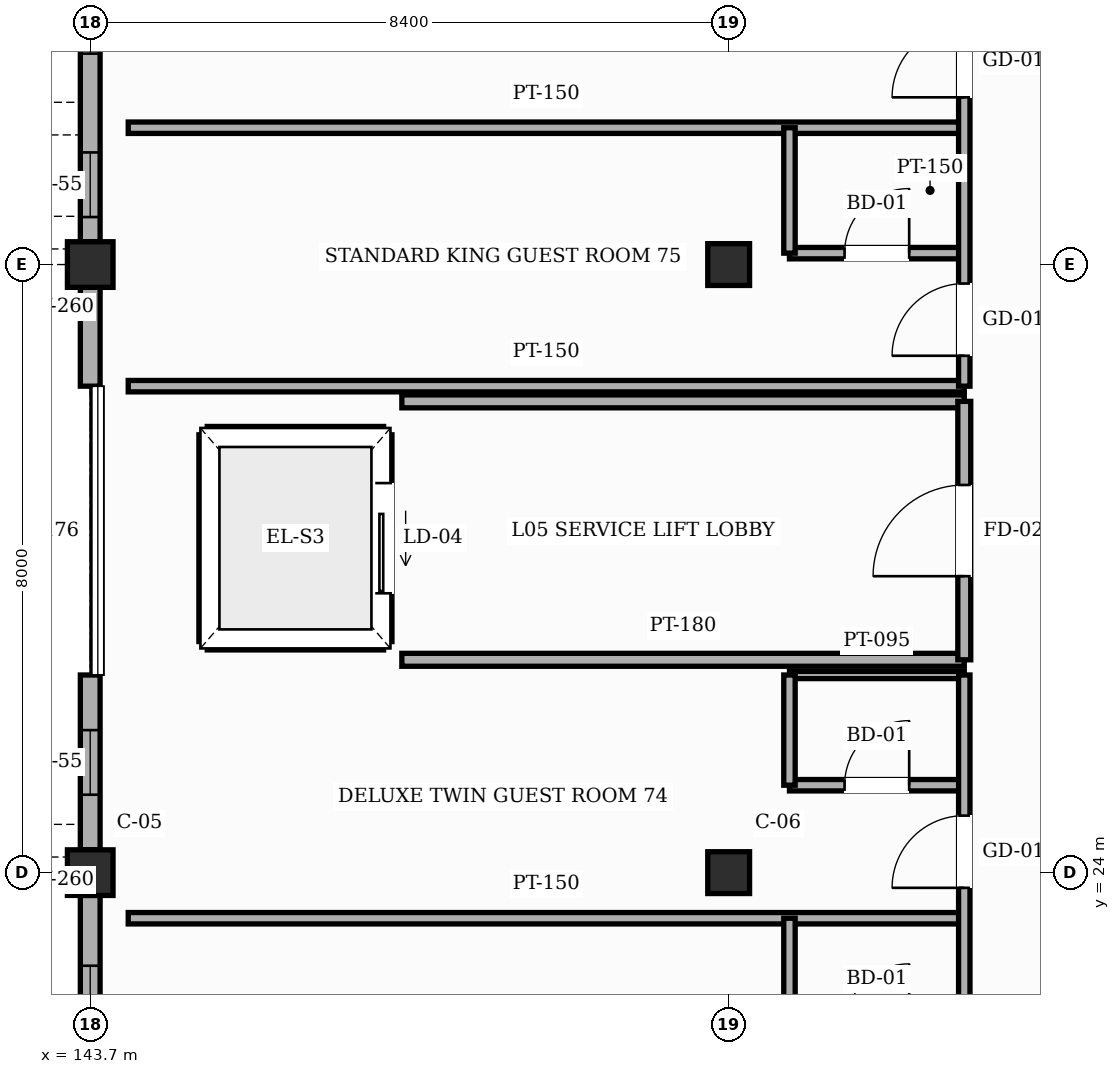
"""IFC4 building model, lengths in metres.
Left out: names, types, materials, properties, quantities, classifications, styles, units other than length and angle.
Written with IfcOpenShell. Run it as: python <this file> out.ifc"""

import sys

from ifc_helpers import new_model, si_unit, direction, frame, frame_2d, origin, origin_2d, place, context, subcontext, project, spatial, rectangle, hollow_rectangle, extrude, element, fill, save


model = new_model("IFC4")
c1 = context("Model", 3, precision=1e-05, world=origin(), true_north=direction((0.0, 1.0)))
c2 = subcontext(c1, "Body", "Model", "MODEL_VIEW")
j1 = project(units=[si_unit("LENGTHUNIT", "METRE"), si_unit("PLANEANGLEUNIT", "RADIAN")], contexts=[c1])
p1 = place(None, origin())
s1 = spatial("IfcSite", under=j1, at=p1, CompositionType="ELEMENT")
p2 = place(p1, origin())
s2 = spatial("IfcBuilding", under=s1, at=p2, CompositionType="ELEMENT")
p3 = place(p2, frame((0.0, 0.0, 24.6)))
s3 = spatial("IfcBuildingStorey", under=s2, at=p3, CompositionType="ELEMENT", Elevation=24.6)
for number, where, z_axis, x_axis in (
    (1, (143.7, 24.0, 0.0), (0.0, 0.0, 1.0), (1.0, 0.0, 0.0)),
    (2, (143.7, 32.0, 0.0), (0.0, 0.0, 1.0), (1.0, 0.0, 0.0)),
):
    element("IfcColumn", number, at=place(p3, frame(where, z_axis=z_axis, x_axis=x_axis)), inside=s3, PredefinedType="COLUMN", context=c2, shape_type="SweptSolid", body=[
        extrude(hollow_rectangle(XDim=0.6, YDim=0.6, WallThickness=0.025, InnerFilletRadius=0.025, OuterFilletRadius=0.05, at=origin_2d()), origin(), (0.0, 0.0, 1.0), 3.6),
    ])
for number, where, z_axis, x_axis in (
    (3, (152.1, 24.0, 0.0), (0.0, 0.0, 1.0), (1.0, 0.0, 0.0)),
    (4, (152.1, 32.0, 0.0), (0.0, 0.0, 1.0), (1.0, 0.0, 0.0)),
):
    element("IfcColumn", number, at=place(p3, frame(where, z_axis=z_axis, x_axis=x_axis)), inside=s3, PredefinedType="COLUMN", context=c2, shape_type="SweptSolid", body=[
        extrude(hollow_rectangle(XDim=0.55, YDim=0.55, WallThickness=0.022, InnerFilletRadius=0.022, OuterFilletRadius=0.044, at=origin_2d()), origin(), (0.0, 0.0, 1.0), 3.6),
    ])
p4 = place(p3, frame((143.7, 16.3, 0.0), z_axis=(0.0, 0.0, 1.0), x_axis=(0.0, 1.0, 0.0)))
e5 = element("IfcWall", 5, at=p4, inside=s3, PredefinedType="SOLIDWALL", context=c2, shape_type="SweptSolid", body=[
    extrude(rectangle(XDim=7.4, YDim=0.26, at=frame_2d((3.7, 0.0))), origin(), (0.0, 0.0, 1.0), 2.805),
])
p5 = place(p4, frame((1.425, 0.0, 0.85)))
e6 = element("IfcOpeningElement", 6, at=p5, cuts=e5, PredefinedType="OPENING", context=c2, shape_type="SweptSolid", body=[
    extrude(rectangle(XDim=1.75, YDim=1.35, at=frame_2d((0.875, 0.675))), frame((0.0, 0.14, 0.0), z_axis=(0.0, -1.0, 0.0), x_axis=(1.0, 0.0, 0.0)), (0.0, 0.0, 1.0), 0.28),
])
p6 = place(p4, frame((4.525, 0.0, 0.85)))
e7 = element("IfcOpeningElement", 7, at=p6, cuts=e5, PredefinedType="OPENING", context=c2, shape_type="SweptSolid", body=[
    extrude(rectangle(XDim=1.95, YDim=1.35, at=frame_2d((0.975, 0.675))), frame((0.0, 0.14, 0.0), z_axis=(0.0, -1.0, 0.0), x_axis=(1.0, 0.0, 0.0)), (0.0, 0.0, 1.0), 0.28),
])
p7 = place(p3, frame((143.7, 24.3, 0.0), z_axis=(0.0, 0.0, 1.0), x_axis=(0.0, 1.0, 0.0)))
e8 = element("IfcWall", 8, at=p7, inside=s3, PredefinedType="SOLIDWALL", context=c2, shape_type="SweptSolid", body=[
    extrude(rectangle(XDim=2.3, YDim=0.26, at=frame_2d((1.15, 0.0))), origin(), (0.0, 0.0, 1.0), 2.805),
])
p8 = place(p7, frame((0.725, 0.0, 0.85)))
e9 = element("IfcOpeningElement", 9, at=p8, cuts=e8, PredefinedType="OPENING", context=c2, shape_type="SweptSolid", body=[
    extrude(rectangle(XDim=0.85, YDim=1.35, at=frame_2d((0.425, 0.675))), frame((0.0, 0.14, 0.0), z_axis=(0.0, -1.0, 0.0), x_axis=(1.0, 0.0, 0.0)), (0.0, 0.0, 1.0), 0.28),
])
p9 = place(p3, frame((143.7, 30.4, 0.0), z_axis=(0.0, 0.0, 1.0), x_axis=(0.0, 1.0, 0.0)))
e10 = element("IfcWall", 10, at=p9, inside=s3, PredefinedType="SOLIDWALL", context=c2, shape_type="SweptSolid", body=[
    extrude(rectangle(XDim=1.3, YDim=0.26, at=frame_2d((0.65, 0.0))), origin(), (0.0, 0.0, 1.0), 2.805),
])
p10 = place(p3, frame((143.7, 32.3, 0.0), z_axis=(0.0, 0.0, 1.0), x_axis=(0.0, 1.0, 0.0)))
e11 = element("IfcWall", 11, at=p10, inside=s3, PredefinedType="SOLIDWALL", context=c2, shape_type="SweptSolid", body=[
    extrude(rectangle(XDim=8.3, YDim=0.26, at=frame_2d((4.15, 0.0))), origin(), (0.0, 0.0, 1.0), 2.655),
])
p11 = place(p10, frame((0.325, 0.0, 0.85)))
e12 = element("IfcOpeningElement", 12, at=p11, cuts=e11, PredefinedType="OPENING", context=c2, shape_type="SweptSolid", body=[
    extrude(rectangle(XDim=0.85, YDim=1.35, at=frame_2d((0.425, 0.675))), frame((0.0, 0.14, 0.0), z_axis=(0.0, -1.0, 0.0), x_axis=(1.0, 0.0, 0.0)), (0.0, 0.0, 1.0), 0.28),
])
p12 = place(p10, frame((2.475, 0.0, 0.85)))
e13 = element("IfcOpeningElement", 13, at=p12, cuts=e11, PredefinedType="OPENING", context=c2, shape_type="SweptSolid", body=[
    extrude(rectangle(XDim=1.45, YDim=1.35, at=frame_2d((0.725, 0.675))), frame((0.0, 0.14, 0.0), z_axis=(0.0, -1.0, 0.0), x_axis=(1.0, 0.0, 0.0)), (0.0, 0.0, 1.0), 0.28),
])
p13 = place(p10, frame((5.775, 0.0, 0.85)))
e14 = element("IfcOpeningElement", 14, at=p13, cuts=e11, PredefinedType="OPENING", context=c2, shape_type="SweptSolid", body=[
    extrude(rectangle(XDim=1.65, YDim=1.35, at=frame_2d((0.825, 0.675))), frame((0.0, 0.14, 0.0), z_axis=(0.0, -1.0, 0.0), x_axis=(1.0, 0.0, 0.0)), (0.0, 0.0, 1.0), 0.28),
])
for number, where, z_axis, x_axis in (
    (15, (145.24, 29.76, 0.0), (0.0, 0.0, 1.0), (1.0, 0.0, 0.0)),
    (16, (145.24, 27.04, 0.0), (0.0, 0.0, 1.0), (1.0, 0.0, 0.0)),
):
    element("IfcWall", number, at=place(p3, frame(where, z_axis=z_axis, x_axis=x_axis)), inside=s3, PredefinedType="SHEAR", context=c2, shape_type="SweptSolid", body=[
        extrude(rectangle(XDim=2.32, YDim=0.22, at=frame_2d((1.16, 0.0))), origin(), (0.0, 0.0, 1.0), 3.38),
    ])
p14 = place(p3, frame((147.56, 27.04, 0.0), z_axis=(0.0, 0.0, 1.0), x_axis=(0.0, 1.0, 0.0)))
e17 = element("IfcWall", 17, at=p14, inside=s3, PredefinedType="SHEAR", context=c2, shape_type="SweptSolid", body=[
    extrude(rectangle(XDim=2.72, YDim=0.22, at=frame_2d((1.36, 0.0))), origin(), (0.0, 0.0, 1.0), 3.38),
])
p15 = place(p14, frame((0.635, 0.0, 0.0)))
e18 = element("IfcOpeningElement", 18, at=p15, cuts=e17, PredefinedType="OPENING", context=c2, shape_type="SweptSolid", body=[
    extrude(rectangle(XDim=1.45, YDim=2.35, at=frame_2d((0.725, 1.175))), frame((0.0, 0.12, 0.0), z_axis=(0.0, -1.0, 0.0), x_axis=(1.0, 0.0, 0.0)), (0.0, 0.0, 1.0), 0.24),
])
p16 = place(p3, frame((145.24, 27.04, 0.0), z_axis=(0.0, 0.0, 1.0), x_axis=(0.0, 1.0, 0.0)))
e19 = element("IfcWall", 19, at=p16, inside=s3, PredefinedType="SHEAR", context=c2, shape_type="SweptSolid", body=[
    extrude(rectangle(XDim=2.72, YDim=0.22, at=frame_2d((1.36, 0.0))), origin(), (0.0, 0.0, 1.0), 3.38),
])
p17 = place(p3, frame((144.2, 23.4, 0.0), z_axis=(0.0, 0.0, 1.0), x_axis=(1.0, 0.0, 0.0)))
e20 = element("IfcWall", 20, at=p17, inside=s3, PredefinedType="PARTITIONING", context=c2, shape_type="SweptSolid", body=[
    extrude(rectangle(XDim=11.0, YDim=0.15, at=frame_2d((5.5, 0.0))), origin(), (0.0, 0.0, 1.0), 3.365),
])
p18 = place(p3, frame((152.9, 25.15, 0.0), z_axis=(0.0, 0.0, 1.0), x_axis=(1.0, 0.0, 0.0)))
e21 = element("IfcWall", 21, at=p18, inside=s3, PredefinedType="PARTITIONING", context=c2, shape_type="SweptSolid", body=[
    extrude(rectangle(XDim=2.3, YDim=0.15, at=frame_2d((1.15, 0.0))), origin(), (0.0, 0.0, 1.0), 3.365),
])
p19 = place(p18, frame((0.725, 0.0, 0.0)))
e22 = element("IfcOpeningElement", 22, at=p19, cuts=e21, PredefinedType="OPENING", context=c2, shape_type="SweptSolid", body=[
    extrude(rectangle(XDim=0.85, YDim=2.1, at=frame_2d((0.425, 1.05))), frame((0.0, 0.085, 0.0), z_axis=(0.0, -1.0, 0.0), x_axis=(1.0, 0.0, 0.0)), (0.0, 0.0, 1.0), 0.17),
])
p20 = place(p3, frame((152.9, 26.6, 0.0), z_axis=(0.0, 0.0, 1.0), x_axis=(1.0, 0.0, 0.0)))
e23 = element("IfcWall", 23, at=p20, inside=s3, PredefinedType="PARTITIONING", context=c2, shape_type="SweptSolid", body=[
    extrude(rectangle(XDim=2.3, YDim=0.095, at=frame_2d((1.15, 0.0))), origin(), (0.0, 0.0, 1.0), 3.365),
])
for number, where, z_axis, x_axis in (
    (24, (147.8, 26.8, 0.0), (0.0, 0.0, 1.0), (1.0, 0.0, 0.0)),
    (25, (147.8, 30.2, 0.0), (0.0, 0.0, 1.0), (1.0, 0.0, 0.0)),
):
    element("IfcWall", number, at=place(p3, frame(where, z_axis=z_axis, x_axis=x_axis)), inside=s3, PredefinedType="PARTITIONING", context=c2, shape_type="SweptSolid", body=[
        extrude(rectangle(XDim=7.4, YDim=0.17, at=frame_2d((3.7, 0.0))), origin(), (0.0, 0.0, 1.0), 3.365),
    ])
p21 = place(p3, frame((144.2, 30.4, 0.0), z_axis=(0.0, 0.0, 1.0), x_axis=(1.0, 0.0, 0.0)))
e26 = element("IfcWall", 26, at=p21, inside=s3, PredefinedType="PARTITIONING", context=c2, shape_type="SweptSolid", body=[
    extrude(rectangle(XDim=11.0, YDim=0.15, at=frame_2d((5.5, 0.0))), origin(), (0.0, 0.0, 1.0), 3.365),
])
p22 = place(p3, frame((152.9, 32.15, 0.0), z_axis=(0.0, 0.0, 1.0), x_axis=(1.0, 0.0, 0.0)))
e27 = element("IfcWall", 27, at=p22, inside=s3, PredefinedType="PARTITIONING", context=c2, shape_type="SweptSolid", body=[
    extrude(rectangle(XDim=2.3, YDim=0.15, at=frame_2d((1.15, 0.0))), origin(), (0.0, 0.0, 1.0), 2.805),
])
p23 = place(p22, frame((0.725, 0.0, 0.0)))
e28 = element("IfcOpeningElement", 28, at=p23, cuts=e27, PredefinedType="OPENING", context=c2, shape_type="SweptSolid", body=[
    extrude(rectangle(XDim=0.85, YDim=2.1, at=frame_2d((0.425, 1.05))), frame((0.0, 0.085, 0.0), z_axis=(0.0, -1.0, 0.0), x_axis=(1.0, 0.0, 0.0)), (0.0, 0.0, 1.0), 0.17),
])
p24 = place(p3, frame((144.2, 33.8, 0.0), z_axis=(0.0, 0.0, 1.0), x_axis=(1.0, 0.0, 0.0)))
e29 = element("IfcWall", 29, at=p24, inside=s3, PredefinedType="PARTITIONING", context=c2, shape_type="SweptSolid", body=[
    extrude(rectangle(XDim=11.0, YDim=0.15, at=frame_2d((5.5, 0.0))), origin(), (0.0, 0.0, 1.0), 3.365),
])
p25 = place(p3, frame((152.9, 21.95, 0.0), z_axis=(0.0, 0.0, 1.0), x_axis=(0.0, 1.0, 0.0)))
e30 = element("IfcWall", 30, at=p25, inside=s3, PredefinedType="PARTITIONING", context=c2, shape_type="SweptSolid", body=[
    extrude(rectangle(XDim=1.45, YDim=0.15, at=frame_2d((0.725, 0.0))), origin(), (0.0, 0.0, 1.0), 3.365),
])
p26 = place(p3, frame((152.9, 25.15, 0.0), z_axis=(0.0, 0.0, 1.0), x_axis=(0.0, 1.0, 0.0)))
e31 = element("IfcWall", 31, at=p26, inside=s3, PredefinedType="PARTITIONING", context=c2, shape_type="SweptSolid", body=[
    extrude(rectangle(XDim=1.45, YDim=0.15, at=frame_2d((0.725, 0.0))), origin(), (0.0, 0.0, 1.0), 3.365),
])
p27 = place(p3, frame((152.9, 32.15, 0.0), z_axis=(0.0, 0.0, 1.0), x_axis=(0.0, 1.0, 0.0)))
e32 = element("IfcWall", 32, at=p27, inside=s3, PredefinedType="PARTITIONING", context=c2, shape_type="SweptSolid", body=[
    extrude(rectangle(XDim=1.65, YDim=0.15, at=frame_2d((0.825, 0.0))), origin(), (0.0, 0.0, 1.0), 3.365),
])
p28 = place(p3, frame((155.2, 1.0, 0.0), z_axis=(0.0, 0.0, 1.0), x_axis=(0.0, 1.0, 0.0)))
e33 = element("IfcWall", 33, at=p28, inside=s3, PredefinedType="PARTITIONING", context=c2, shape_type="SweptSolid", body=[
    extrude(rectangle(XDim=25.6, YDim=0.15, at=frame_2d((12.8, 0.0))), origin(), (0.0, 0.0, 1.0), 3.365),
])
p29 = place(p28, frame((0.325, 0.0, 0.0)))
e34 = element("IfcOpeningElement", 34, at=p29, cuts=e33, PredefinedType="OPENING", context=c2, shape_type="SweptSolid", body=[
    extrude(rectangle(XDim=1.1, YDim=2.2, at=frame_2d((0.55, 1.1))), frame((0.0, 0.085, 0.0), z_axis=(0.0, -1.0, 0.0), x_axis=(1.0, 0.0, 0.0)), (0.0, 0.0, 1.0), 0.17),
])
p30 = place(p28, frame((3.6, 0.0, 0.0)))
e35 = element("IfcOpeningElement", 35, at=p30, cuts=e33, PredefinedType="OPENING", context=c2, shape_type="SweptSolid", body=[
    extrude(rectangle(XDim=0.95, YDim=2.15, at=frame_2d((0.475, 1.075))), frame((0.0, 0.085, 0.0), z_axis=(0.0, -1.0, 0.0), x_axis=(1.0, 0.0, 0.0)), (0.0, 0.0, 1.0), 0.17),
])
p31 = place(p28, frame((6.8, 0.0, 0.0)))
e36 = element("IfcOpeningElement", 36, at=p31, cuts=e33, PredefinedType="OPENING", context=c2, shape_type="SweptSolid", body=[
    extrude(rectangle(XDim=0.95, YDim=2.15, at=frame_2d((0.475, 1.075))), frame((0.0, 0.085, 0.0), z_axis=(0.0, -1.0, 0.0), x_axis=(1.0, 0.0, 0.0)), (0.0, 0.0, 1.0), 0.17),
])
p32 = place(p28, frame((10.0, 0.0, 0.0)))
e37 = element("IfcOpeningElement", 37, at=p32, cuts=e33, PredefinedType="OPENING", context=c2, shape_type="SweptSolid", body=[
    extrude(rectangle(XDim=0.95, YDim=2.15, at=frame_2d((0.475, 1.075))), frame((0.0, 0.085, 0.0), z_axis=(0.0, -1.0, 0.0), x_axis=(1.0, 0.0, 0.0)), (0.0, 0.0, 1.0), 0.17),
])
p33 = place(p28, frame((13.2, 0.0, 0.0)))
e38 = element("IfcOpeningElement", 38, at=p33, cuts=e33, PredefinedType="OPENING", context=c2, shape_type="SweptSolid", body=[
    extrude(rectangle(XDim=0.95, YDim=2.15, at=frame_2d((0.475, 1.075))), frame((0.0, 0.085, 0.0), z_axis=(0.0, -1.0, 0.0), x_axis=(1.0, 0.0, 0.0)), (0.0, 0.0, 1.0), 0.17),
])
p34 = place(p28, frame((16.4, 0.0, 0.0)))
e39 = element("IfcOpeningElement", 39, at=p34, cuts=e33, PredefinedType="OPENING", context=c2, shape_type="SweptSolid", body=[
    extrude(rectangle(XDim=0.95, YDim=2.15, at=frame_2d((0.475, 1.075))), frame((0.0, 0.085, 0.0), z_axis=(0.0, -1.0, 0.0), x_axis=(1.0, 0.0, 0.0)), (0.0, 0.0, 1.0), 0.17),
])
p35 = place(p28, frame((19.6, 0.0, 0.0)))
e40 = element("IfcOpeningElement", 40, at=p35, cuts=e33, PredefinedType="OPENING", context=c2, shape_type="SweptSolid", body=[
    extrude(rectangle(XDim=0.95, YDim=2.15, at=frame_2d((0.475, 1.075))), frame((0.0, 0.085, 0.0), z_axis=(0.0, -1.0, 0.0), x_axis=(1.0, 0.0, 0.0)), (0.0, 0.0, 1.0), 0.17),
])
p36 = place(p28, frame((22.8, 0.0, 0.0)))
e41 = element("IfcOpeningElement", 41, at=p36, cuts=e33, PredefinedType="OPENING", context=c2, shape_type="SweptSolid", body=[
    extrude(rectangle(XDim=0.95, YDim=2.15, at=frame_2d((0.475, 1.075))), frame((0.0, 0.085, 0.0), z_axis=(0.0, -1.0, 0.0), x_axis=(1.0, 0.0, 0.0)), (0.0, 0.0, 1.0), 0.17),
])
p37 = place(p3, frame((155.2, 26.8, 0.0), z_axis=(0.0, 0.0, 1.0), x_axis=(0.0, 1.0, 0.0)))
e42 = element("IfcWall", 42, at=p37, inside=s3, PredefinedType="PARTITIONING", context=c2, shape_type="SweptSolid", body=[
    extrude(rectangle(XDim=3.4, YDim=0.17, at=frame_2d((1.7, 0.0))), origin(), (0.0, 0.0, 1.0), 3.365),
])
p38 = place(p37, frame((1.1, 0.0, 0.0)))
e43 = element("IfcOpeningElement", 43, at=p38, cuts=e42, PredefinedType="OPENING", context=c2, shape_type="SweptSolid", body=[
    extrude(rectangle(XDim=1.2, YDim=2.2, at=frame_2d((0.6, 1.1))), frame((0.0, 0.095, 0.0), z_axis=(0.0, -1.0, 0.0), x_axis=(1.0, 0.0, 0.0)), (0.0, 0.0, 1.0), 0.19),
])
p39 = place(p3, frame((155.2, 30.4, 0.0), z_axis=(0.0, 0.0, 1.0), x_axis=(0.0, 1.0, 0.0)))
e44 = element("IfcWall", 44, at=p39, inside=s3, PredefinedType="PARTITIONING", context=c2, shape_type="SweptSolid", body=[
    extrude(rectangle(XDim=10.2, YDim=0.15, at=frame_2d((5.1, 0.0))), origin(), (0.0, 0.0, 1.0), 3.365),
])
p40 = place(p39, frame((0.4, 0.0, 0.0)))
e45 = element("IfcOpeningElement", 45, at=p40, cuts=e44, PredefinedType="OPENING", context=c2, shape_type="SweptSolid", body=[
    extrude(rectangle(XDim=0.95, YDim=2.15, at=frame_2d((0.475, 1.075))), frame((0.0, 0.085, 0.0), z_axis=(0.0, -1.0, 0.0), x_axis=(1.0, 0.0, 0.0)), (0.0, 0.0, 1.0), 0.17),
])
p41 = place(p39, frame((3.8, 0.0, 0.0)))
e46 = element("IfcOpeningElement", 46, at=p41, cuts=e44, PredefinedType="OPENING", context=c2, shape_type="SweptSolid", body=[
    extrude(rectangle(XDim=0.95, YDim=2.15, at=frame_2d((0.475, 1.075))), frame((0.0, 0.085, 0.0), z_axis=(0.0, -1.0, 0.0), x_axis=(1.0, 0.0, 0.0)), (0.0, 0.0, 1.0), 0.17),
])
p42 = place(p39, frame((7.2, 0.0, 0.0)))
e47 = element("IfcOpeningElement", 47, at=p42, cuts=e44, PredefinedType="OPENING", context=c2, shape_type="SweptSolid", body=[
    extrude(rectangle(XDim=0.95, YDim=2.15, at=frame_2d((0.475, 1.075))), frame((0.0, 0.085, 0.0), z_axis=(0.0, -1.0, 0.0), x_axis=(1.0, 0.0, 0.0)), (0.0, 0.0, 1.0), 0.17),
])
p43 = place(p6, origin())
e48 = element("IfcWindow", 48, at=p43, inside=s3, PartitioningType="SINGLE_PANEL", PredefinedType="WINDOW", context=c2, shape_type="SweptSolid", body=[
    extrude(rectangle(XDim=1.95, YDim=1.35, at=frame_2d((0.975, 0.675))), frame((0.0, 0.03, 0.0), z_axis=(0.0, -1.0, 0.0), x_axis=(1.0, 0.0, 0.0)), (0.0, 0.0, 1.0), 0.06),
])
fill(e7, e48)
p44 = place(p8, origin())
e49 = element("IfcWindow", 49, at=p44, inside=s3, PartitioningType="SINGLE_PANEL", PredefinedType="WINDOW", context=c2, shape_type="SweptSolid", body=[
    extrude(rectangle(XDim=0.85, YDim=1.35, at=frame_2d((0.425, 0.675))), frame((0.0, 0.03, 0.0), z_axis=(0.0, -1.0, 0.0), x_axis=(1.0, 0.0, 0.0)), (0.0, 0.0, 1.0), 0.06),
])
fill(e9, e49)
p45 = place(p11, origin())
e50 = element("IfcWindow", 50, at=p45, inside=s3, PartitioningType="SINGLE_PANEL", PredefinedType="WINDOW", context=c2, shape_type="SweptSolid", body=[
    extrude(rectangle(XDim=0.85, YDim=1.35, at=frame_2d((0.425, 0.675))), frame((0.0, 0.03, 0.0), z_axis=(0.0, -1.0, 0.0), x_axis=(1.0, 0.0, 0.0)), (0.0, 0.0, 1.0), 0.06),
])
fill(e12, e50)
p46 = place(p12, origin())
e51 = element("IfcWindow", 51, at=p46, inside=s3, PartitioningType="SINGLE_PANEL", PredefinedType="WINDOW", context=c2, shape_type="SweptSolid", body=[
    extrude(rectangle(XDim=1.45, YDim=1.35, at=frame_2d((0.725, 0.675))), frame((0.0, 0.03, 0.0), z_axis=(0.0, -1.0, 0.0), x_axis=(1.0, 0.0, 0.0)), (0.0, 0.0, 1.0), 0.06),
])
fill(e13, e51)
p47 = place(p15, origin())
e52 = element("IfcDoor", 52, at=p47, inside=s3, OperationType="SLIDING_TO_LEFT", PredefinedType="DOOR", context=c2, shape_type="SweptSolid", body=[
    extrude(rectangle(XDim=1.45, YDim=2.35, at=frame_2d((0.725, 1.175))), frame((0.0, 0.025, 0.0), z_axis=(0.0, -1.0, 0.0), x_axis=(1.0, 0.0, 0.0)), (0.0, 0.0, 1.0), 0.05),
])
fill(e18, e52)
p48 = place(p38, origin())
e53 = element("IfcDoor", 53, at=p48, inside=s3, OperationType="SINGLE_SWING_LEFT", PredefinedType="DOOR", context=c2, shape_type="SweptSolid", body=[
    extrude(rectangle(XDim=1.2, YDim=2.2, at=frame_2d((0.6, 1.1))), frame((0.0, 0.025, 0.0), z_axis=(0.0, -1.0, 0.0), x_axis=(1.0, 0.0, 0.0)), (0.0, 0.0, 1.0), 0.05),
])
fill(e43, e53)
p49 = place(p36, origin())
e54 = element("IfcDoor", 54, at=p49, inside=s3, OperationType="SINGLE_SWING_LEFT", PredefinedType="DOOR", context=c2, shape_type="SweptSolid", body=[
    extrude(rectangle(XDim=0.95, YDim=2.15, at=frame_2d((0.475, 1.075))), frame((0.0, 0.025, 0.0), z_axis=(0.0, -1.0, 0.0), x_axis=(1.0, 0.0, 0.0)), (0.0, 0.0, 1.0), 0.05),
])
fill(e41, e54)
p50 = place(p19, origin())
e55 = element("IfcDoor", 55, at=p50, inside=s3, OperationType="SINGLE_SWING_RIGHT", PredefinedType="DOOR", context=c2, shape_type="SweptSolid", body=[
    extrude(rectangle(XDim=0.85, YDim=2.1, at=frame_2d((0.425, 1.05))), frame((0.0, 0.025, 0.0), z_axis=(0.0, -1.0, 0.0), x_axis=(1.0, 0.0, 0.0)), (0.0, 0.0, 1.0), 0.05),
])
fill(e22, e55)
p51 = place(p40, origin())
e56 = element("IfcDoor", 56, at=p51, inside=s3, OperationType="SINGLE_SWING_LEFT", PredefinedType="DOOR", context=c2, shape_type="SweptSolid", body=[
    extrude(rectangle(XDim=0.95, YDim=2.15, at=frame_2d((0.475, 1.075))), frame((0.0, 0.025, 0.0), z_axis=(0.0, -1.0, 0.0), x_axis=(1.0, 0.0, 0.0)), (0.0, 0.0, 1.0), 0.05),
])
fill(e45, e56)
p52 = place(p23, origin())
e57 = element("IfcDoor", 57, at=p52, inside=s3, OperationType="SINGLE_SWING_RIGHT", PredefinedType="DOOR", context=c2, shape_type="SweptSolid", body=[
    extrude(rectangle(XDim=0.85, YDim=2.1, at=frame_2d((0.425, 1.05))), frame((0.0, 0.025, 0.0), z_axis=(0.0, -1.0, 0.0), x_axis=(1.0, 0.0, 0.0)), (0.0, 0.0, 1.0), 0.05),
])
fill(e28, e57)
p53 = place(p41, origin())
e58 = element("IfcDoor", 58, at=p53, inside=s3, OperationType="SINGLE_SWING_LEFT", PredefinedType="DOOR", context=c2, shape_type="SweptSolid", body=[
    extrude(rectangle(XDim=0.95, YDim=2.15, at=frame_2d((0.475, 1.075))), frame((0.0, 0.025, 0.0), z_axis=(0.0, -1.0, 0.0), x_axis=(1.0, 0.0, 0.0)), (0.0, 0.0, 1.0), 0.05),
])
fill(e46, e58)
save(model, sys.argv[1])
